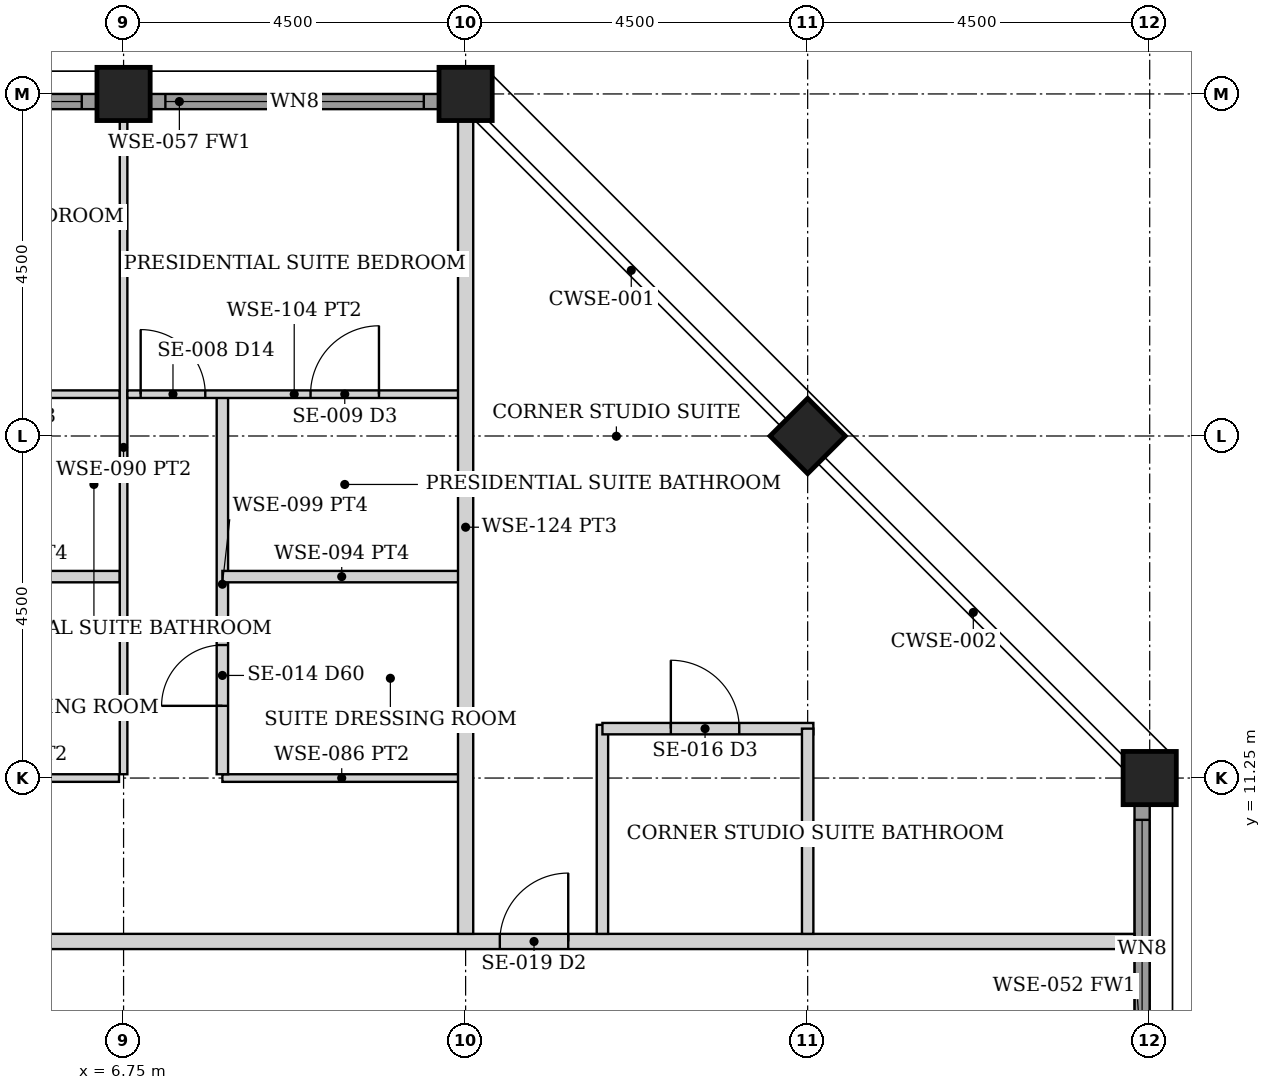
"""IFC4 building model, lengths in metres.
Left out: names, types, materials, properties, quantities, classifications, styles, units other than length and angle.
Written with IfcOpenShell. Run it as: python <this file> out.ifc"""

import sys

from ifc_helpers import new_model, si_unit, direction, frame, frame_2d, origin, origin_2d, place, context, subcontext, project, spatial, rectangle, hollow_rectangle, extrude, element, fill, save


model = new_model("IFC4")
c1 = context("Model", 3, precision=1e-05, world=origin(), true_north=direction((0.0, 1.0)))
c2 = subcontext(c1, "Body", "Model", "MODEL_VIEW")
j1 = project(units=[si_unit("LENGTHUNIT", "METRE"), si_unit("PLANEANGLEUNIT", "RADIAN")], contexts=[c1])
p1 = place(None, origin())
s1 = spatial("IfcSite", under=j1, at=p1, CompositionType="ELEMENT")
p2 = place(p1, origin())
s2 = spatial("IfcBuilding", under=s1, at=p2, CompositionType="ELEMENT")
p3 = place(p2, frame((0.0, 0.0, 253.3)))
s3 = spatial("IfcBuildingStorey", under=s2, at=p3, CompositionType="ELEMENT", Elevation=253.3)
for number, where, z_axis, x_axis in (
    (1, (6.75, 20.25, 0.0), (0.0, 0.0, 1.0), (0.0, 1.0, 0.0)),
    (2, (11.25, 20.25, 0.0), (0.0, 0.0, 1.0), (0.0, 1.0, 0.0)),
    (3, (20.25, 11.25, 0.0), (0.0, 0.0, 1.0), (1.0, 0.0, 0.0)),
    (4, (15.75, 15.75, 0.0), (0.0, 0.0, 1.0), (0.707, 0.707, 0.0)),
):
    element("IfcColumn", number, at=place(p3, frame(where, z_axis=z_axis, x_axis=x_axis)), inside=s3, PredefinedType="COLUMN", context=c2, shape_type="SweptSolid", body=[
        extrude(hollow_rectangle(XDim=0.7, YDim=0.7, WallThickness=0.035, at=origin_2d()), origin(), (0.0, 0.0, 1.0), 3.75),
    ])
p4 = place(p3, frame((20.15, 7.105, 0.0), z_axis=(0.0, 0.0, 1.0), x_axis=(0.0, 1.0, 0.0)))
e5 = element("IfcWall", 5, at=p4, inside=s3, PredefinedType="SOLIDWALL", context=c2, shape_type="SweptSolid", body=[
    extrude(rectangle(XDim=3.79, YDim=0.2, at=frame_2d((1.895, 0.0))), origin(), (0.0, 0.0, 1.0), 2.579),
])
p5 = place(p4, frame((0.195, 0.0, 0.3)))
e6 = element("IfcOpeningElement", 6, at=p5, cuts=e5, PredefinedType="OPENING", context=c2, shape_type="SweptSolid", body=[
    extrude(rectangle(XDim=3.4, YDim=2.129, at=frame_2d((1.7, 1.064))), frame((0.0, 0.11, 0.0), z_axis=(0.0, -1.0, 0.0), x_axis=(1.0, 0.0, 0.0)), (0.0, 0.0, 1.0), 0.22),
])
p6 = place(p3, frame((2.605, 20.15, 0.0), z_axis=(0.0, 0.0, 1.0), x_axis=(1.0, 0.0, 0.0)))
e7 = element("IfcWall", 7, at=p6, inside=s3, PredefinedType="SOLIDWALL", context=c2, shape_type="SweptSolid", body=[
    extrude(rectangle(XDim=3.79, YDim=0.2, at=frame_2d((1.895, 0.0))), origin(), (0.0, 0.0, 1.0), 2.579),
])
p7 = place(p6, frame((0.195, 0.0, 0.3)))
e8 = element("IfcOpeningElement", 8, at=p7, cuts=e7, PredefinedType="OPENING", context=c2, shape_type="SweptSolid", body=[
    extrude(rectangle(XDim=3.4, YDim=2.129, at=frame_2d((1.7, 1.064))), frame((0.0, 0.11, 0.0), z_axis=(0.0, -1.0, 0.0), x_axis=(1.0, 0.0, 0.0)), (0.0, 0.0, 1.0), 0.22),
])
p8 = place(p3, frame((7.105, 20.15, 0.0), z_axis=(0.0, 0.0, 1.0), x_axis=(1.0, 0.0, 0.0)))
e9 = element("IfcWall", 9, at=p8, inside=s3, PredefinedType="SOLIDWALL", context=c2, shape_type="SweptSolid", body=[
    extrude(rectangle(XDim=3.79, YDim=0.2, at=frame_2d((1.895, 0.0))), origin(), (0.0, 0.0, 1.0), 2.579),
])
p9 = place(p8, frame((0.195, 0.0, 0.3)))
e10 = element("IfcOpeningElement", 10, at=p9, cuts=e9, PredefinedType="OPENING", context=c2, shape_type="SweptSolid", body=[
    extrude(rectangle(XDim=3.4, YDim=2.129, at=frame_2d((1.7, 1.064))), frame((0.0, 0.11, 0.0), z_axis=(0.0, -1.0, 0.0), x_axis=(1.0, 0.0, 0.0)), (0.0, 0.0, 1.0), 0.22),
])
p10 = place(p3, frame((-20.05, 9.1, 0.0), z_axis=(0.0, 0.0, 1.0), x_axis=(1.0, 0.0, 0.0)))
e11 = element("IfcWall", 11, at=p10, inside=s3, PredefinedType="PARTITIONING", context=c2, shape_type="SweptSolid", body=[
    extrude(rectangle(XDim=40.1, YDim=0.2, at=frame_2d((20.05, 0.0))), origin(), (0.0, 0.0, 1.0), 2.573),
])
p11 = place(p10, frame((9.1, 0.0, 0.0)))
e12 = element("IfcOpeningElement", 12, at=p11, cuts=e11, PredefinedType="OPENING", context=c2, shape_type="SweptSolid", body=[
    extrude(rectangle(XDim=0.9, YDim=2.1, at=frame_2d((0.45, 1.05))), frame((0.0, 0.11, 0.0), z_axis=(0.0, -1.0, 0.0), x_axis=(1.0, 0.0, 0.0)), (0.0, 0.0, 1.0), 0.22),
])
p12 = place(p10, frame((31.75, 0.0, 0.0)))
e13 = element("IfcOpeningElement", 13, at=p12, cuts=e11, PredefinedType="OPENING", context=c2, shape_type="SweptSolid", body=[
    extrude(rectangle(XDim=0.9, YDim=2.1, at=frame_2d((0.45, 1.05))), frame((0.0, 0.11, 0.0), z_axis=(0.0, -1.0, 0.0), x_axis=(1.0, 0.0, 0.0)), (0.0, 0.0, 1.0), 0.22),
])
p13 = place(p10, frame((7.45, 0.0, 0.0)))
e14 = element("IfcOpeningElement", 14, at=p13, cuts=e11, PredefinedType="OPENING", context=c2, shape_type="SweptSolid", body=[
    extrude(rectangle(XDim=0.9, YDim=2.1, at=frame_2d((0.45, 1.05))), frame((0.0, 0.11, 0.0), z_axis=(0.0, -1.0, 0.0), x_axis=(1.0, 0.0, 0.0)), (0.0, 0.0, 1.0), 0.22),
])
p14 = place(p3, frame((3.55, 11.25, 0.0), z_axis=(0.0, 0.0, 1.0), x_axis=(1.0, 0.0, 0.0)))
e15 = element("IfcWall", 15, at=p14, inside=s3, PredefinedType="PARTITIONING", context=c2, shape_type="SweptSolid", body=[
    extrude(rectangle(XDim=3.14, YDim=0.1, at=frame_2d((1.57, 0.0))), origin(), (0.0, 0.0, 1.0), 2.573),
])
p15 = place(p3, frame((2.3, 16.3, 0.0), z_axis=(0.0, 0.0, 1.0), x_axis=(1.0, 0.0, 0.0)))
e16 = element("IfcWall", 16, at=p15, inside=s3, PredefinedType="PARTITIONING", context=c2, shape_type="SweptSolid", body=[
    extrude(rectangle(XDim=4.4, YDim=0.1, at=frame_2d((2.2, 0.0))), origin(), (0.0, 0.0, 1.0), 2.573),
])
p16 = place(p15, frame((0.175, 0.0, 0.0)))
e17 = element("IfcOpeningElement", 17, at=p16, cuts=e16, PredefinedType="OPENING", context=c2, shape_type="SweptSolid", body=[
    extrude(rectangle(XDim=0.85, YDim=2.1, at=frame_2d((0.425, 1.05))), frame((0.0, 0.06, 0.0), z_axis=(0.0, -1.0, 0.0), x_axis=(1.0, 0.0, 0.0)), (0.0, 0.0, 1.0), 0.12),
])
p17 = place(p15, frame((2.41, 0.0, 0.0)))
e18 = element("IfcOpeningElement", 18, at=p17, cuts=e16, PredefinedType="OPENING", context=c2, shape_type="SweptSolid", body=[
    extrude(rectangle(XDim=0.9, YDim=2.1, at=frame_2d((0.45, 1.05))), frame((0.0, 0.06, 0.0), z_axis=(0.0, -1.0, 0.0), x_axis=(1.0, 0.0, 0.0)), (0.0, 0.0, 1.0), 0.12),
])
p18 = place(p3, frame((3.55, 13.9, 0.0), z_axis=(0.0, 0.0, 1.0), x_axis=(1.0, 0.0, 0.0)))
e19 = element("IfcWall", 19, at=p18, inside=s3, PredefinedType="PARTITIONING", context=c2, shape_type="SweptSolid", body=[
    extrude(rectangle(XDim=3.15, YDim=0.15, at=frame_2d((1.575, 0.0))), origin(), (0.0, 0.0, 1.0), 2.573),
])
p19 = place(p3, frame((6.75, 11.3, 0.0), z_axis=(0.0, 0.0, 1.0), x_axis=(0.0, 1.0, 0.0)))
e20 = element("IfcWall", 20, at=p19, inside=s3, PredefinedType="PARTITIONING", context=c2, shape_type="SweptSolid", body=[
    extrude(rectangle(XDim=8.6, YDim=0.1, at=frame_2d((4.3, 0.0))), origin(), (0.0, 0.0, 1.0), 2.573),
])
p20 = place(p3, frame((8.05, 11.25, 0.0), z_axis=(0.0, 0.0, 1.0), x_axis=(1.0, 0.0, 0.0)))
e21 = element("IfcWall", 21, at=p20, inside=s3, PredefinedType="PARTITIONING", context=c2, shape_type="SweptSolid", body=[
    extrude(rectangle(XDim=3.14, YDim=0.1, at=frame_2d((1.57, 0.0))), origin(), (0.0, 0.0, 1.0), 2.573),
])
p21 = place(p3, frame((8.05, 11.3, 0.0), z_axis=(0.0, 0.0, 1.0), x_axis=(0.0, 1.0, 0.0)))
e22 = element("IfcWall", 22, at=p21, inside=s3, PredefinedType="PARTITIONING", context=c2, shape_type="SweptSolid", body=[
    extrude(rectangle(XDim=5.0, YDim=0.15, at=frame_2d((2.5, 0.0))), origin(), (0.0, 0.0, 1.0), 2.573),
])
p22 = place(p21, frame((0.9, 0.0, 0.0)))
e23 = element("IfcOpeningElement", 23, at=p22, cuts=e22, PredefinedType="OPENING", context=c2, shape_type="SweptSolid", body=[
    extrude(rectangle(XDim=0.8, YDim=2.1, at=frame_2d((0.4, 1.05))), frame((0.0, 0.085, 0.0), z_axis=(0.0, -1.0, 0.0), x_axis=(1.0, 0.0, 0.0)), (0.0, 0.0, 1.0), 0.17),
])
p23 = place(p3, frame((6.8, 16.3, 0.0), z_axis=(0.0, 0.0, 1.0), x_axis=(1.0, 0.0, 0.0)))
e24 = element("IfcWall", 24, at=p23, inside=s3, PredefinedType="PARTITIONING", context=c2, shape_type="SweptSolid", body=[
    extrude(rectangle(XDim=4.39, YDim=0.1, at=frame_2d((2.195, 0.0))), origin(), (0.0, 0.0, 1.0), 2.573),
])
p24 = place(p23, frame((0.175, 0.0, 0.0)))
e25 = element("IfcOpeningElement", 25, at=p24, cuts=e24, PredefinedType="OPENING", context=c2, shape_type="SweptSolid", body=[
    extrude(rectangle(XDim=0.85, YDim=2.1, at=frame_2d((0.425, 1.05))), frame((0.0, 0.06, 0.0), z_axis=(0.0, -1.0, 0.0), x_axis=(1.0, 0.0, 0.0)), (0.0, 0.0, 1.0), 0.12),
])
p25 = place(p23, frame((2.41, 0.0, 0.0)))
e26 = element("IfcOpeningElement", 26, at=p25, cuts=e24, PredefinedType="OPENING", context=c2, shape_type="SweptSolid", body=[
    extrude(rectangle(XDim=0.9, YDim=2.1, at=frame_2d((0.45, 1.05))), frame((0.0, 0.06, 0.0), z_axis=(0.0, -1.0, 0.0), x_axis=(1.0, 0.0, 0.0)), (0.0, 0.0, 1.0), 0.12),
])
p26 = place(p3, frame((8.05, 13.9, 0.0), z_axis=(0.0, 0.0, 1.0), x_axis=(1.0, 0.0, 0.0)))
e27 = element("IfcWall", 27, at=p26, inside=s3, PredefinedType="PARTITIONING", context=c2, shape_type="SweptSolid", body=[
    extrude(rectangle(XDim=3.14, YDim=0.15, at=frame_2d((1.57, 0.0))), origin(), (0.0, 0.0, 1.0), 2.573),
])
p27 = place(p3, frame((11.25, 9.2, 0.0), z_axis=(0.0, 0.0, 1.0), x_axis=(0.0, 1.0, 0.0)))
e28 = element("IfcWall", 28, at=p27, inside=s3, PredefinedType="PARTITIONING", context=c2, shape_type="SweptSolid", body=[
    extrude(rectangle(XDim=10.7, YDim=0.2, at=frame_2d((5.35, 0.0))), origin(), (0.0, 0.0, 1.0), 2.573),
])
p28 = place(p3, frame((13.05, 9.2, 0.0), z_axis=(0.0, 0.0, 1.0), x_axis=(0.0, 1.0, 0.0)))
e29 = element("IfcWall", 29, at=p28, inside=s3, PredefinedType="PARTITIONING", context=c2, shape_type="SweptSolid", body=[
    extrude(rectangle(XDim=2.75, YDim=0.15, at=frame_2d((1.375, 0.0))), origin(), (0.0, 0.0, 1.0), 2.573),
])
p29 = place(p3, frame((13.05, 11.9, 0.0), z_axis=(0.0, 0.0, 1.0), x_axis=(1.0, 0.0, 0.0)))
e30 = element("IfcWall", 30, at=p29, inside=s3, PredefinedType="PARTITIONING", context=c2, shape_type="SweptSolid", body=[
    extrude(rectangle(XDim=2.775, YDim=0.15, at=frame_2d((1.387, 0.0))), origin(), (0.0, 0.0, 1.0), 2.573),
])
p30 = place(p29, frame((0.9, 0.0, 0.0)))
e31 = element("IfcOpeningElement", 31, at=p30, cuts=e30, PredefinedType="OPENING", context=c2, shape_type="SweptSolid", body=[
    extrude(rectangle(XDim=0.9, YDim=2.1, at=frame_2d((0.45, 1.05))), frame((0.0, 0.085, 0.0), z_axis=(0.0, -1.0, 0.0), x_axis=(1.0, 0.0, 0.0)), (0.0, 0.0, 1.0), 0.17),
])
p31 = place(p3, frame((15.75, 9.2, 0.0), z_axis=(0.0, 0.0, 1.0), x_axis=(0.0, 1.0, 0.0)))
e32 = element("IfcWall", 32, at=p31, inside=s3, PredefinedType="PARTITIONING", context=c2, shape_type="SweptSolid", body=[
    extrude(rectangle(XDim=2.7, YDim=0.15, at=frame_2d((1.35, 0.0))), origin(), (0.0, 0.0, 1.0), 2.573),
])
p32 = place(p5, origin())
e33 = element("IfcWindow", 33, at=p32, inside=s3, PartitioningType="SINGLE_PANEL", PredefinedType="WINDOW", context=c2, shape_type="SweptSolid", body=[
    extrude(rectangle(XDim=3.4, YDim=2.129, at=frame_2d((1.7, 1.064))), frame((0.0, 0.03, 0.0), z_axis=(0.0, -1.0, 0.0), x_axis=(1.0, 0.0, 0.0)), (0.0, 0.0, 1.0), 0.06),
])
fill(e6, e33)
p33 = place(p7, origin())
e34 = element("IfcWindow", 34, at=p33, inside=s3, PartitioningType="SINGLE_PANEL", PredefinedType="WINDOW", context=c2, shape_type="SweptSolid", body=[
    extrude(rectangle(XDim=3.4, YDim=2.129, at=frame_2d((1.7, 1.064))), frame((0.0, 0.03, 0.0), z_axis=(0.0, -1.0, 0.0), x_axis=(1.0, 0.0, 0.0)), (0.0, 0.0, 1.0), 0.06),
])
fill(e8, e34)
p34 = place(p9, origin())
e35 = element("IfcWindow", 35, at=p34, inside=s3, PartitioningType="SINGLE_PANEL", PredefinedType="WINDOW", context=c2, shape_type="SweptSolid", body=[
    extrude(rectangle(XDim=3.4, YDim=2.129, at=frame_2d((1.7, 1.064))), frame((0.0, 0.03, 0.0), z_axis=(0.0, -1.0, 0.0), x_axis=(1.0, 0.0, 0.0)), (0.0, 0.0, 1.0), 0.06),
])
fill(e10, e35)
p35 = place(p24, origin())
e36 = element("IfcDoor", 36, at=p35, inside=s3, OperationType="SINGLE_SWING_LEFT", PredefinedType="DOOR", context=c2, shape_type="SweptSolid", body=[
    extrude(rectangle(XDim=0.85, YDim=2.1, at=frame_2d((0.425, 1.05))), frame((0.0, 0.025, 0.0), z_axis=(0.0, -1.0, 0.0), x_axis=(1.0, 0.0, 0.0)), (0.0, 0.0, 1.0), 0.05),
])
fill(e25, e36)
p36 = place(p22, origin())
e37 = element("IfcDoor", 37, at=p36, inside=s3, OperationType="SINGLE_SWING_LEFT", PredefinedType="DOOR", context=c2, shape_type="SweptSolid", body=[
    extrude(rectangle(XDim=0.8, YDim=2.1, at=frame_2d((0.4, 1.05))), frame((0.0, 0.025, 0.0), z_axis=(0.0, -1.0, 0.0), x_axis=(1.0, 0.0, 0.0)), (0.0, 0.0, 1.0), 0.05),
])
fill(e23, e37)
p37 = place(p25, origin())
e38 = element("IfcDoor", 38, at=p37, inside=s3, OperationType="SINGLE_SWING_RIGHT", PredefinedType="DOOR", context=c2, shape_type="SweptSolid", body=[
    extrude(rectangle(XDim=0.9, YDim=2.1, at=frame_2d((0.45, 1.05))), frame((0.0, 0.025, 0.0), z_axis=(0.0, -1.0, 0.0), x_axis=(1.0, 0.0, 0.0)), (0.0, 0.0, 1.0), 0.05),
])
fill(e26, e38)
p38 = place(p12, origin())
e39 = element("IfcDoor", 39, at=p38, inside=s3, OperationType="SINGLE_SWING_RIGHT", PredefinedType="DOOR", context=c2, shape_type="SweptSolid", body=[
    extrude(rectangle(XDim=0.9, YDim=2.1, at=frame_2d((0.45, 1.05))), frame((0.0, 0.025, 0.0), z_axis=(0.0, -1.0, 0.0), x_axis=(1.0, 0.0, 0.0)), (0.0, 0.0, 1.0), 0.05),
])
fill(e13, e39)
p39 = place(p30, origin())
e40 = element("IfcDoor", 40, at=p39, inside=s3, OperationType="SINGLE_SWING_LEFT", PredefinedType="DOOR", context=c2, shape_type="SweptSolid", body=[
    extrude(rectangle(XDim=0.9, YDim=2.1, at=frame_2d((0.45, 1.05))), frame((0.0, 0.025, 0.0), z_axis=(0.0, -1.0, 0.0), x_axis=(1.0, 0.0, 0.0)), (0.0, 0.0, 1.0), 0.05),
])
fill(e31, e40)
save(model, sys.argv[1])
